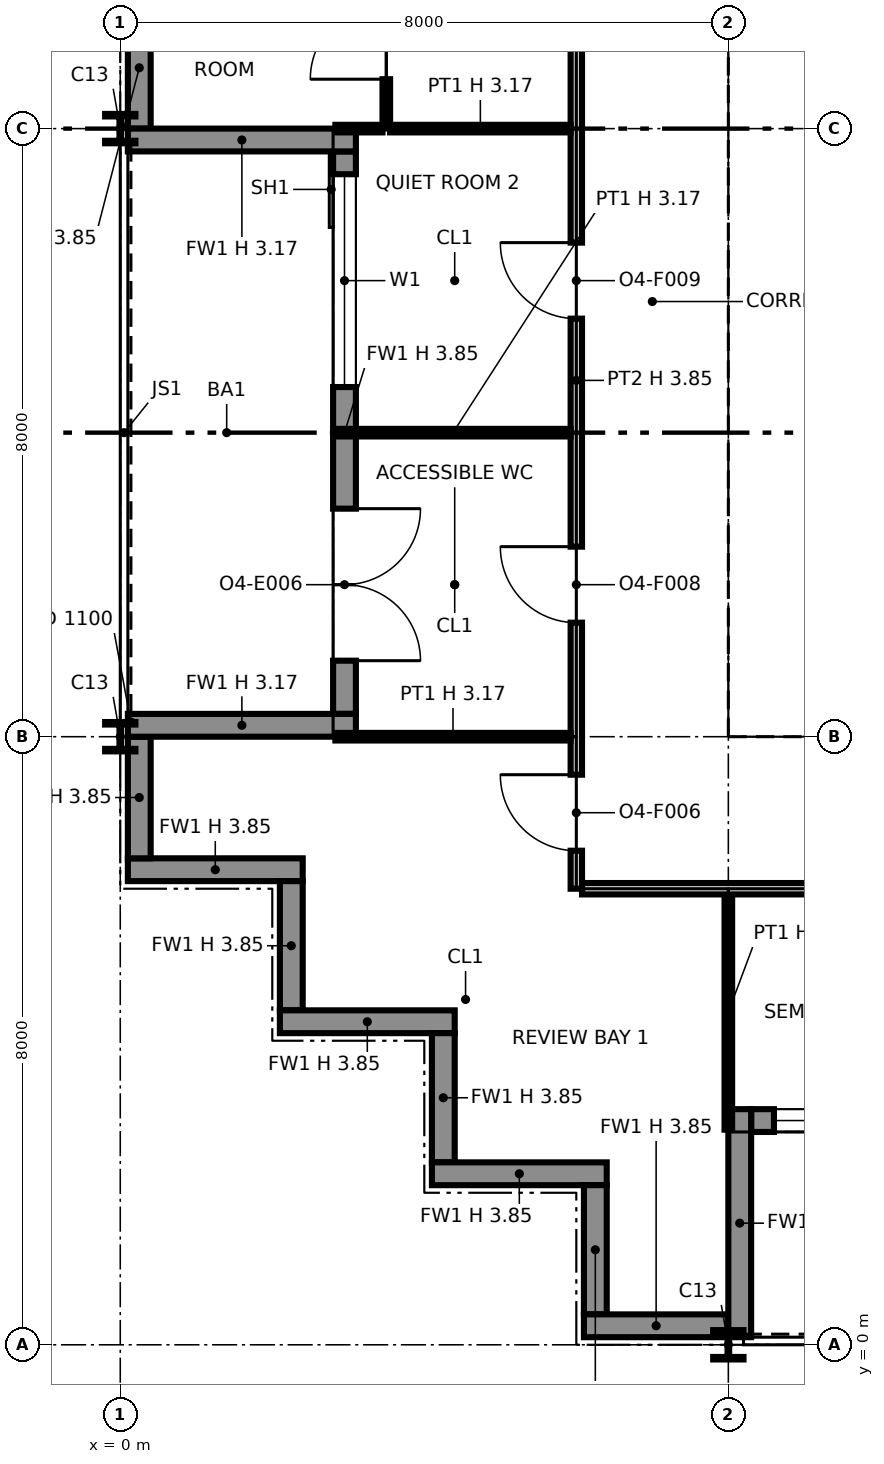
"""IFC4 building model, lengths in metres.
Left out: names, types, materials, properties, quantities, classifications, styles, units other than length and angle.
Written with IfcOpenShell. Run it as: python <this file> out.ifc"""

import sys

from ifc_helpers import new_model, si_unit, direction, frame, frame_2d, origin, origin_2d, place, context, subcontext, project, spatial, polyline, rectangle, i_section, outline, extrude, element, fill, save


model = new_model("IFC4")
c1 = context("Model", 3, precision=1e-05, world=origin(), true_north=direction((0.0, 1.0)))
c2 = subcontext(c1, "Body", "Model", "MODEL_VIEW")
j1 = project(units=[si_unit("LENGTHUNIT", "METRE"), si_unit("PLANEANGLEUNIT", "RADIAN")], contexts=[c1])
p1 = place(None, origin())
s1 = spatial("IfcSite", under=j1, at=p1, CompositionType="ELEMENT")
p2 = place(p1, origin())
s2 = spatial("IfcBuilding", under=s1, at=p2, CompositionType="ELEMENT")
p3 = place(p2, frame((0.0, 0.0, 221.0)))
s3 = spatial("IfcBuildingStorey", under=s2, at=p3, CompositionType="ELEMENT", Elevation=221.0)
for number, where, z_axis, x_axis in (
    (1, (0.0, 8.0, 0.0), (0.0, 0.0, 1.0), (1.0, 0.0, 0.0)),
    (2, (0.0, 16.0, 0.0), (0.0, 0.0, 1.0), (1.0, 0.0, 0.0)),
    (3, (8.0, 0.0, 0.0), (0.0, 0.0, 1.0), (1.0, 0.0, 0.0)),
):
    element("IfcColumn", number, at=place(p3, frame(where, z_axis=z_axis, x_axis=x_axis)), inside=s3, PredefinedType="COLUMN", context=c2, shape_type="SweptSolid", body=[
        extrude(i_section(OverallWidth=0.399, OverallDepth=0.386, WebThickness=0.021, FlangeThickness=0.033, at=origin_2d()), origin(), (0.0, 0.0, 1.0), 3.85),
    ])
for number, where, z_axis, x_axis in (
    (4, (8.0, 8.0, 0.0), (0.0, 0.0, 1.0), (1.0, 0.0, 0.0)),
    (5, (8.0, 16.0, 0.0), (0.0, 0.0, 1.0), (1.0, 0.0, 0.0)),
):
    element("IfcColumn", number, at=place(p3, frame(where, z_axis=z_axis, x_axis=x_axis)), inside=s3, PredefinedType="COLUMN", context=c2, shape_type="SweptSolid", body=[
        extrude(i_section(OverallWidth=0.373, OverallDepth=0.368, WebThickness=0.015, FlangeThickness=0.024, at=origin_2d()), origin(), (0.0, 0.0, 1.0), 3.85),
    ])
p4 = place(p3, frame((0.1, 6.25, 0.0), z_axis=(0.0, 0.0, 1.0), x_axis=(1.0, 0.0, 0.0)))
e6 = element("IfcWall", 6, at=p4, inside=s3, PredefinedType="SOLIDWALL", context=c2, shape_type="SweptSolid", body=[
    extrude(rectangle(XDim=2.3, YDim=0.3, at=frame_2d((1.15, 0.0))), origin(), (0.0, 0.0, 1.0), 3.85),
])
p5 = place(p3, frame((2.25, 6.1, 0.0), z_axis=(0.0, 0.0, 1.0), x_axis=(0.0, -1.0, 0.0)))
e7 = element("IfcWall", 7, at=p5, inside=s3, PredefinedType="SOLIDWALL", context=c2, shape_type="SweptSolid", body=[
    extrude(rectangle(XDim=1.7, YDim=0.3, at=frame_2d((0.85, 0.0))), origin(), (0.0, 0.0, 1.0), 3.85),
])
p6 = place(p3, frame((2.1, 4.25, 0.0), z_axis=(0.0, 0.0, 1.0), x_axis=(1.0, 0.0, 0.0)))
e8 = element("IfcWall", 8, at=p6, inside=s3, PredefinedType="SOLIDWALL", context=c2, shape_type="SweptSolid", body=[
    extrude(rectangle(XDim=2.3, YDim=0.3, at=frame_2d((1.15, 0.0))), origin(), (0.0, 0.0, 1.0), 3.85),
])
p7 = place(p3, frame((4.25, 4.1, 0.0), z_axis=(0.0, 0.0, 1.0), x_axis=(0.0, -1.0, 0.0)))
e9 = element("IfcWall", 9, at=p7, inside=s3, PredefinedType="SOLIDWALL", context=c2, shape_type="SweptSolid", body=[
    extrude(rectangle(XDim=1.7, YDim=0.3, at=frame_2d((0.85, 0.0))), origin(), (0.0, 0.0, 1.0), 3.85),
])
p8 = place(p3, frame((4.1, 2.25, 0.0), z_axis=(0.0, 0.0, 1.0), x_axis=(1.0, 0.0, 0.0)))
e10 = element("IfcWall", 10, at=p8, inside=s3, PredefinedType="SOLIDWALL", context=c2, shape_type="SweptSolid", body=[
    extrude(rectangle(XDim=2.3, YDim=0.3, at=frame_2d((1.15, 0.0))), origin(), (0.0, 0.0, 1.0), 3.85),
])
p9 = place(p3, frame((6.25, 2.1, 0.0), z_axis=(0.0, 0.0, 1.0), x_axis=(0.0, -1.0, 0.0)))
e11 = element("IfcWall", 11, at=p9, inside=s3, PredefinedType="SOLIDWALL", context=c2, shape_type="SweptSolid", body=[
    extrude(rectangle(XDim=1.7, YDim=0.3, at=frame_2d((0.85, 0.0))), origin(), (0.0, 0.0, 1.0), 3.85),
])
p10 = place(p3, frame((6.1, 0.25, 0.0), z_axis=(0.0, 0.0, 1.0), x_axis=(1.0, 0.0, 0.0)))
e12 = element("IfcWall", 12, at=p10, inside=s3, PredefinedType="SOLIDWALL", context=c2, shape_type="SweptSolid", body=[
    extrude(rectangle(XDim=1.9, YDim=0.3, at=frame_2d((0.95, 0.0))), origin(), (0.0, 0.0, 1.0), 3.85),
])
p11 = place(p3, frame((8.3, 2.95, 0.0), z_axis=(0.0, 0.0, 1.0), x_axis=(1.0, 0.0, 0.0)))
e13 = element("IfcWall", 13, at=p11, inside=s3, PredefinedType="SOLIDWALL", context=c2, shape_type="SweptSolid", body=[
    extrude(rectangle(XDim=7.4, YDim=0.3, at=frame_2d((3.7, 0.0))), origin(), (0.0, 0.0, 1.0), 3.85),
])
p12 = place(p11, frame((0.3, 0.0, 0.9)))
e14 = element("IfcOpeningElement", 14, at=p12, cuts=e13, PredefinedType="OPENING", context=c2, shape_type="SweptSolid", body=[
    extrude(rectangle(XDim=2.8, YDim=2.2, at=frame_2d((1.4, 1.1))), frame((0.0, 0.16, 0.0), z_axis=(0.0, -1.0, 0.0), x_axis=(1.0, 0.0, 0.0)), (0.0, 0.0, 1.0), 0.32),
])
p13 = place(p11, frame((4.7, 0.0, 0.0)))
e15 = element("IfcOpeningElement", 15, at=p13, cuts=e13, PredefinedType="OPENING", context=c2, shape_type="SweptSolid", body=[
    extrude(rectangle(XDim=2.0, YDim=2.4, at=frame_2d((1.0, 1.2))), frame((0.0, 0.16, 0.0), z_axis=(0.0, -1.0, 0.0), x_axis=(1.0, 0.0, 0.0)), (0.0, 0.0, 1.0), 0.32),
])
p14 = place(p3, frame((8.15, 0.1, 0.0), z_axis=(0.0, 0.0, 1.0), x_axis=(0.0, 1.0, 0.0)))
e16 = element("IfcWall", 16, at=p14, inside=s3, PredefinedType="SOLIDWALL", context=c2, shape_type="SweptSolid", body=[
    extrude(rectangle(XDim=3.0, YDim=0.3, at=frame_2d((1.5, 0.0))), origin(), (0.0, 0.0, 1.0), 3.171),
])
p15 = place(p3, frame((0.25, 17.6, 0.0), z_axis=(0.0, 0.0, 1.0), x_axis=(0.0, -1.0, 0.0)))
e17 = element("IfcWall", 17, at=p15, inside=s3, PredefinedType="SOLIDWALL", context=c2, shape_type="SweptSolid", body=[
    extrude(rectangle(XDim=1.6, YDim=0.3, at=frame_2d((0.8, 0.0))), origin(), (0.0, 0.0, 1.0), 3.85),
])
p16 = place(p3, frame((2.95, 15.7, 0.0), z_axis=(0.0, 0.0, 1.0), x_axis=(0.0, -1.0, 0.0)))
e18 = element("IfcWall", 18, at=p16, inside=s3, PredefinedType="SOLIDWALL", context=c2, shape_type="SweptSolid", body=[
    extrude(rectangle(XDim=7.4, YDim=0.3, at=frame_2d((3.7, 0.0))), origin(), (0.0, 0.0, 1.0), 3.85),
])
p17 = place(p16, frame((0.3, 0.0, 0.9)))
e19 = element("IfcOpeningElement", 19, at=p17, cuts=e18, PredefinedType="OPENING", context=c2, shape_type="SweptSolid", body=[
    extrude(rectangle(XDim=2.8, YDim=2.2, at=frame_2d((1.4, 1.1))), frame((0.0, 0.16, 0.0), z_axis=(0.0, -1.0, 0.0), x_axis=(1.0, 0.0, 0.0)), (0.0, 0.0, 1.0), 0.32),
])
p18 = place(p16, frame((4.7, 0.0, 0.0)))
e20 = element("IfcOpeningElement", 20, at=p18, cuts=e18, PredefinedType="OPENING", context=c2, shape_type="SweptSolid", body=[
    extrude(rectangle(XDim=2.0, YDim=2.4, at=frame_2d((1.0, 1.2))), frame((0.0, 0.16, 0.0), z_axis=(0.0, -1.0, 0.0), x_axis=(1.0, 0.0, 0.0)), (0.0, 0.0, 1.0), 0.32),
])
for number, where, z_axis, x_axis in (
    (21, (0.1, 15.85, 0.0), (0.0, 0.0, 1.0), (1.0, 0.0, 0.0)),
    (22, (0.1, 8.15, 0.0), (0.0, 0.0, 1.0), (1.0, 0.0, 0.0)),
):
    element("IfcWall", number, at=place(p3, frame(where, z_axis=z_axis, x_axis=x_axis)), inside=s3, PredefinedType="SOLIDWALL", context=c2, shape_type="SweptSolid", body=[
        extrude(rectangle(XDim=3.0, YDim=0.3, at=frame_2d((1.5, 0.0))), origin(), (0.0, 0.0, 1.0), 3.171),
    ])
p19 = place(p3, frame((0.25, 8.0, 0.0), z_axis=(0.0, 0.0, 1.0), x_axis=(0.0, -1.0, 0.0)))
e23 = element("IfcWall", 23, at=p19, inside=s3, PredefinedType="SOLIDWALL", context=c2, shape_type="SweptSolid", body=[
    extrude(rectangle(XDim=1.6, YDim=0.3, at=frame_2d((0.8, 0.0))), origin(), (0.0, 0.0, 1.0), 3.85),
])
p20 = place(p3, frame((8.65, 8.75, 0.0), z_axis=(0.0, 0.0, 1.0), x_axis=(1.0, 0.0, 0.0)))
e24 = element("IfcWall", 24, at=p20, inside=s3, PredefinedType="PARTITIONING", context=c2, shape_type="SweptSolid", body=[
    extrude(outline(polyline([(0.0, 0.0), (14.7, 0.0), (14.7, 3.85), (7.438, 3.85), (7.438, 3.308), (7.262, 3.308), (7.261, 3.85), (0.0, 3.85), (0.0, 0.0)])), frame((0.0, 0.1, 0.0), z_axis=(0.0, -1.0, 0.0), x_axis=(1.0, 0.0, 0.0)), (0.0, 0.0, 1.0), 0.2),
])
p21 = place(p20, frame((1.3, 0.0, 0.0)))
e25 = element("IfcOpeningElement", 25, at=p21, cuts=e24, PredefinedType="OPENING", context=c2, shape_type="SweptSolid", body=[
    extrude(rectangle(XDim=1.4, YDim=2.1, at=frame_2d((0.7, 1.05))), frame((0.0, 0.11, 0.0), z_axis=(0.0, -1.0, 0.0), x_axis=(1.0, 0.0, 0.0)), (0.0, 0.0, 1.0), 0.22),
])
p22 = place(p20, frame((4.6, 0.0, 0.0)))
e26 = element("IfcOpeningElement", 26, at=p22, cuts=e24, PredefinedType="OPENING", context=c2, shape_type="SweptSolid", body=[
    extrude(rectangle(XDim=1.4, YDim=2.1, at=frame_2d((0.7, 1.05))), frame((0.0, 0.11, 0.0), z_axis=(0.0, -1.0, 0.0), x_axis=(1.0, 0.0, 0.0)), (0.0, 0.0, 1.0), 0.22),
])
p23 = place(p20, frame((10.4, 0.0, 0.0)))
e27 = element("IfcOpeningElement", 27, at=p23, cuts=e24, PredefinedType="OPENING", context=c2, shape_type="SweptSolid", body=[
    extrude(rectangle(XDim=1.2, YDim=2.1, at=frame_2d((0.6, 1.05))), frame((0.0, 0.11, 0.0), z_axis=(0.0, -1.0, 0.0), x_axis=(1.0, 0.0, 0.0)), (0.0, 0.0, 1.0), 0.22),
])
p24 = place(p3, frame((8.75, 8.85, 0.0), z_axis=(0.0, 0.0, 1.0), x_axis=(0.0, 1.0, 0.0)))
e28 = element("IfcWall", 28, at=p24, inside=s3, PredefinedType="PARTITIONING", context=c2, shape_type="SweptSolid", body=[
    extrude(outline(polyline([(0.0, 0.0), (14.3, 0.0), (14.3, 3.85), (10.225, 3.85), (10.224, 3.44), (10.076, 3.44), (10.075, 3.85), (7.239, 3.85), (7.238, 3.308), (7.062, 3.308), (7.062, 3.85), (0.0, 3.85), (0.0, 0.0)])), frame((0.0, 0.1, 0.0), z_axis=(0.0, -1.0, 0.0), x_axis=(1.0, 0.0, 0.0)), (0.0, 0.0, 1.0), 0.2),
])
p25 = place(p24, frame((8.3, 0.0, 0.0)))
e29 = element("IfcOpeningElement", 29, at=p25, cuts=e28, PredefinedType="OPENING", context=c2, shape_type="SweptSolid", body=[
    extrude(rectangle(XDim=1.8, YDim=2.1, at=frame_2d((0.9, 1.05))), frame((0.0, 0.11, 0.0), z_axis=(0.0, -1.0, 0.0), x_axis=(1.0, 0.0, 0.0)), (0.0, 0.0, 1.0), 0.22),
])
p26 = place(p3, frame((8.85, 16.0, 0.0), z_axis=(0.0, 0.0, 1.0), x_axis=(1.0, 0.0, 0.0)))
e30 = element("IfcWall", 30, at=p26, inside=s3, PredefinedType="PARTITIONING", context=c2, shape_type="SweptSolid", body=[
    extrude(rectangle(XDim=6.953, YDim=0.6, at=frame_2d((3.477, 0.0))), origin(), (0.0, 0.0, 1.0), 3.308),
])
p27 = place(p3, frame((8.0, 2.83, 0.0), z_axis=(0.0, 0.0, 1.0), x_axis=(0.0, 1.0, 0.0)))
e31 = element("IfcWall", 31, at=p27, inside=s3, PredefinedType="PARTITIONING", context=c2, shape_type="SweptSolid", body=[
    extrude(rectangle(XDim=3.095, YDim=0.1, at=frame_2d((1.547, 0.0))), origin(), (0.0, 0.0, 1.0), 3.172),
])
p28 = place(p3, frame((6.075, 6.0, 0.0), z_axis=(0.0, 0.0, 1.0), x_axis=(1.0, 0.0, 0.0)))
e32 = element("IfcWall", 32, at=p28, inside=s3, PredefinedType="PARTITIONING", context=c2, shape_type="SweptSolid", body=[
    extrude(rectangle(XDim=35.85, YDim=0.15, at=frame_2d((17.925, 0.0))), origin(), (0.0, 0.0, 1.0), 3.85),
])
p29 = place(p28, frame((12.425, 0.0, 0.0), z_axis=(0.0, 0.0, 1.0), x_axis=(-1.0, 0.0, 0.0)))
e33 = element("IfcOpeningElement", 33, at=p29, cuts=e32, PredefinedType="OPENING", context=c2, shape_type="SweptSolid", body=[
    extrude(rectangle(XDim=1.0, YDim=2.1, at=frame_2d((0.5, 1.05))), frame((0.0, 0.085, 0.0), z_axis=(0.0, -1.0, 0.0), x_axis=(1.0, 0.0, 0.0)), (0.0, 0.0, 1.0), 0.17),
])
p30 = place(p28, frame((16.425, 0.0, 0.0), z_axis=(0.0, 0.0, 1.0), x_axis=(-1.0, 0.0, 0.0)))
e34 = element("IfcOpeningElement", 34, at=p30, cuts=e32, PredefinedType="OPENING", context=c2, shape_type="SweptSolid", body=[
    extrude(rectangle(XDim=1.0, YDim=2.1, at=frame_2d((0.5, 1.05))), frame((0.0, 0.085, 0.0), z_axis=(0.0, -1.0, 0.0), x_axis=(1.0, 0.0, 0.0)), (0.0, 0.0, 1.0), 0.17),
])
p31 = place(p28, frame((30.425, 0.0, 0.0), z_axis=(0.0, 0.0, 1.0), x_axis=(-1.0, 0.0, 0.0)))
e35 = element("IfcOpeningElement", 35, at=p31, cuts=e32, PredefinedType="OPENING", context=c2, shape_type="SweptSolid", body=[
    extrude(rectangle(XDim=1.0, YDim=2.1, at=frame_2d((0.5, 1.05))), frame((0.0, 0.085, 0.0), z_axis=(0.0, -1.0, 0.0), x_axis=(1.0, 0.0, 0.0)), (0.0, 0.0, 1.0), 0.17),
])
p32 = place(p28, frame((6.425, 0.0, 0.0), z_axis=(0.0, 0.0, 1.0), x_axis=(-1.0, 0.0, 0.0)))
e36 = element("IfcOpeningElement", 36, at=p32, cuts=e32, PredefinedType="OPENING", context=c2, shape_type="SweptSolid", body=[
    extrude(rectangle(XDim=1.0, YDim=2.1, at=frame_2d((0.5, 1.05))), frame((0.0, 0.085, 0.0), z_axis=(0.0, -1.0, 0.0), x_axis=(1.0, 0.0, 0.0)), (0.0, 0.0, 1.0), 0.17),
])
p33 = place(p28, frame((23.425, 0.0, 0.0), z_axis=(0.0, 0.0, 1.0), x_axis=(-1.0, 0.0, 0.0)))
e37 = element("IfcOpeningElement", 37, at=p33, cuts=e32, PredefinedType="OPENING", context=c2, shape_type="SweptSolid", body=[
    extrude(rectangle(XDim=1.0, YDim=2.1, at=frame_2d((0.5, 1.05))), frame((0.0, 0.085, 0.0), z_axis=(0.0, -1.0, 0.0), x_axis=(1.0, 0.0, 0.0)), (0.0, 0.0, 1.0), 0.17),
])
p34 = place(p28, frame((35.425, 0.0, 0.0), z_axis=(0.0, 0.0, 1.0), x_axis=(-1.0, 0.0, 0.0)))
e38 = element("IfcOpeningElement", 38, at=p34, cuts=e32, PredefinedType="OPENING", context=c2, shape_type="SweptSolid", body=[
    extrude(rectangle(XDim=1.0, YDim=2.1, at=frame_2d((0.5, 1.05))), frame((0.0, 0.085, 0.0), z_axis=(0.0, -1.0, 0.0), x_axis=(1.0, 0.0, 0.0)), (0.0, 0.0, 1.0), 0.17),
])
p35 = place(p3, frame((6.0, 6.0, 0.0), z_axis=(0.0, 0.0, 1.0), x_axis=(0.0, 1.0, 0.0)))
e39 = element("IfcWall", 39, at=p35, inside=s3, PredefinedType="PARTITIONING", context=c2, shape_type="SweptSolid", body=[
    extrude(outline(polyline([(0.0, 0.0), (13.375, 0.0), (13.375, 3.85), (10.3, 3.85), (10.298, 3.172), (9.702, 3.172), (9.7, 3.85), (6.3, 3.85), (6.298, 3.172), (5.702, 3.172), (5.7, 3.85), (2.3, 3.85), (2.298, 3.172), (1.702, 3.172), (1.7, 3.85), (0.0, 3.85), (0.0, 0.0)])), frame((0.0, 0.075, 0.0), z_axis=(0.0, -1.0, 0.0), x_axis=(1.0, 0.0, 0.0)), (0.0, 0.0, 1.0), 0.15),
])
p36 = place(p35, frame((0.5, 0.0, 0.0)))
e40 = element("IfcOpeningElement", 40, at=p36, cuts=e39, PredefinedType="OPENING", context=c2, shape_type="SweptSolid", body=[
    extrude(rectangle(XDim=1.0, YDim=2.1, at=frame_2d((0.5, 1.05))), frame((0.0, 0.085, 0.0), z_axis=(0.0, -1.0, 0.0), x_axis=(1.0, 0.0, 0.0)), (0.0, 0.0, 1.0), 0.17),
])
p37 = place(p35, frame((3.5, 0.0, 0.0)))
e41 = element("IfcOpeningElement", 41, at=p37, cuts=e39, PredefinedType="OPENING", context=c2, shape_type="SweptSolid", body=[
    extrude(rectangle(XDim=1.0, YDim=2.1, at=frame_2d((0.5, 1.05))), frame((0.0, 0.085, 0.0), z_axis=(0.0, -1.0, 0.0), x_axis=(1.0, 0.0, 0.0)), (0.0, 0.0, 1.0), 0.17),
])
p38 = place(p35, frame((7.5, 0.0, 0.0)))
e42 = element("IfcOpeningElement", 42, at=p38, cuts=e39, PredefinedType="OPENING", context=c2, shape_type="SweptSolid", body=[
    extrude(rectangle(XDim=1.0, YDim=2.1, at=frame_2d((0.5, 1.05))), frame((0.0, 0.085, 0.0), z_axis=(0.0, -1.0, 0.0), x_axis=(1.0, 0.0, 0.0)), (0.0, 0.0, 1.0), 0.17),
])
p39 = place(p35, frame((11.225, 0.0, 0.0)))
e43 = element("IfcOpeningElement", 43, at=p39, cuts=e39, PredefinedType="OPENING", context=c2, shape_type="SweptSolid", body=[
    extrude(rectangle(XDim=1.0, YDim=2.1, at=frame_2d((0.5, 1.05))), frame((0.0, 0.085, 0.0), z_axis=(0.0, -1.0, 0.0), x_axis=(1.0, 0.0, 0.0)), (0.0, 0.0, 1.0), 0.17),
])
for number, where, z_axis, x_axis in (
    (44, (2.83, 8.0, 0.0), (0.0, 0.0, 1.0), (1.0, 0.0, 0.0)),
    (45, (2.83, 12.0, 0.0), (0.0, 0.0, 1.0), (1.0, 0.0, 0.0)),
):
    element("IfcWall", number, at=place(p3, frame(where, z_axis=z_axis, x_axis=x_axis)), inside=s3, PredefinedType="PARTITIONING", context=c2, shape_type="SweptSolid", body=[
        extrude(rectangle(XDim=3.095, YDim=0.1, at=frame_2d((1.547, 0.0))), origin(), (0.0, 0.0, 1.0), 3.172),
    ])
p40 = place(p3, frame((2.83, 16.0, 0.0), z_axis=(0.0, 0.0, 1.0), x_axis=(1.0, 0.0, 0.0)))
e46 = element("IfcWall", 46, at=p40, inside=s3, PredefinedType="PARTITIONING", context=c2, shape_type="SweptSolid", body=[
    extrude(rectangle(XDim=0.62, YDim=0.1, at=frame_2d((0.31, 0.0))), origin(), (0.0, 0.0, 1.0), 3.172),
])
p41 = place(p3, frame((3.55, 16.0, 0.0), z_axis=(0.0, 0.0, 1.0), x_axis=(1.0, 0.0, 0.0)))
e47 = element("IfcWall", 47, at=p41, inside=s3, PredefinedType="PARTITIONING", context=c2, shape_type="SweptSolid", body=[
    extrude(rectangle(XDim=2.375, YDim=0.1, at=frame_2d((1.188, 0.0))), origin(), (0.0, 0.0, 1.0), 3.172),
])
p42 = place(p3, frame((3.5, 16.0, 0.0), z_axis=(0.0, 0.0, 1.0), x_axis=(0.0, 1.0, 0.0)))
e48 = element("IfcWall", 48, at=p42, inside=s3, PredefinedType="PARTITIONING", context=c2, shape_type="SweptSolid", body=[
    extrude(rectangle(XDim=3.57, YDim=0.1, at=frame_2d((1.785, 0.0))), origin(), (0.0, 0.0, 1.0), 3.85),
])
p43 = place(p42, frame((0.65, 0.0, 0.0)))
e49 = element("IfcOpeningElement", 49, at=p43, cuts=e48, PredefinedType="OPENING", context=c2, shape_type="SweptSolid", body=[
    extrude(rectangle(XDim=1.0, YDim=2.1, at=frame_2d((0.5, 1.05))), frame((0.0, 0.06, 0.0), z_axis=(0.0, -1.0, 0.0), x_axis=(1.0, 0.0, 0.0)), (0.0, 0.0, 1.0), 0.12),
])
p44 = place(p12, origin())
e50 = element("IfcWindow", 50, at=p44, inside=s3, PartitioningType="SINGLE_PANEL", PredefinedType="WINDOW", context=c2, shape_type="SweptSolid", body=[
    extrude(rectangle(XDim=2.8, YDim=2.2, at=frame_2d((1.4, 1.1))), frame((0.0, 0.03, 0.0), z_axis=(0.0, -1.0, 0.0), x_axis=(1.0, 0.0, 0.0)), (0.0, 0.0, 1.0), 0.06),
])
fill(e14, e50)
p45 = place(p17, origin())
e51 = element("IfcWindow", 51, at=p45, inside=s3, PartitioningType="SINGLE_PANEL", PredefinedType="WINDOW", context=c2, shape_type="SweptSolid", body=[
    extrude(rectangle(XDim=2.8, YDim=2.2, at=frame_2d((1.4, 1.1))), frame((0.0, 0.03, 0.0), z_axis=(0.0, -1.0, 0.0), x_axis=(1.0, 0.0, 0.0)), (0.0, 0.0, 1.0), 0.06),
])
fill(e19, e51)
p46 = place(p18, origin())
e52 = element("IfcDoor", 52, at=p46, inside=s3, OperationType="DOUBLE_DOOR_SINGLE_SWING", PredefinedType="DOOR", context=c2, shape_type="SweptSolid", body=[
    extrude(rectangle(XDim=2.0, YDim=2.4, at=frame_2d((1.0, 1.2))), frame((0.0, 0.025, 0.0), z_axis=(0.0, -1.0, 0.0), x_axis=(1.0, 0.0, 0.0)), (0.0, 0.0, 1.0), 0.05),
])
fill(e20, e52)
p47 = place(p36, origin())
e53 = element("IfcDoor", 53, at=p47, inside=s3, OperationType="SINGLE_SWING_RIGHT", PredefinedType="DOOR", context=c2, shape_type="SweptSolid", body=[
    extrude(rectangle(XDim=1.0, YDim=2.1, at=frame_2d((0.5, 1.05))), frame((0.0, 0.025, 0.0), z_axis=(0.0, -1.0, 0.0), x_axis=(1.0, 0.0, 0.0)), (0.0, 0.0, 1.0), 0.05),
])
fill(e40, e53)
p48 = place(p37, origin())
e54 = element("IfcDoor", 54, at=p48, inside=s3, OperationType="SINGLE_SWING_RIGHT", PredefinedType="DOOR", context=c2, shape_type="SweptSolid", body=[
    extrude(rectangle(XDim=1.0, YDim=2.1, at=frame_2d((0.5, 1.05))), frame((0.0, 0.025, 0.0), z_axis=(0.0, -1.0, 0.0), x_axis=(1.0, 0.0, 0.0)), (0.0, 0.0, 1.0), 0.05),
])
fill(e41, e54)
p49 = place(p38, origin())
e55 = element("IfcDoor", 55, at=p49, inside=s3, OperationType="SINGLE_SWING_RIGHT", PredefinedType="DOOR", context=c2, shape_type="SweptSolid", body=[
    extrude(rectangle(XDim=1.0, YDim=2.1, at=frame_2d((0.5, 1.05))), frame((0.0, 0.025, 0.0), z_axis=(0.0, -1.0, 0.0), x_axis=(1.0, 0.0, 0.0)), (0.0, 0.0, 1.0), 0.05),
])
fill(e42, e55)
p50 = place(p43, origin())
e56 = element("IfcDoor", 56, at=p50, inside=s3, OperationType="SINGLE_SWING_LEFT", PredefinedType="DOOR", context=c2, shape_type="SweptSolid", body=[
    extrude(rectangle(XDim=1.0, YDim=2.1, at=frame_2d((0.5, 1.05))), frame((0.0, 0.025, 0.0), z_axis=(0.0, -1.0, 0.0), x_axis=(1.0, 0.0, 0.0)), (0.0, 0.0, 1.0), 0.05),
])
fill(e49, e56)
save(model, sys.argv[1])
